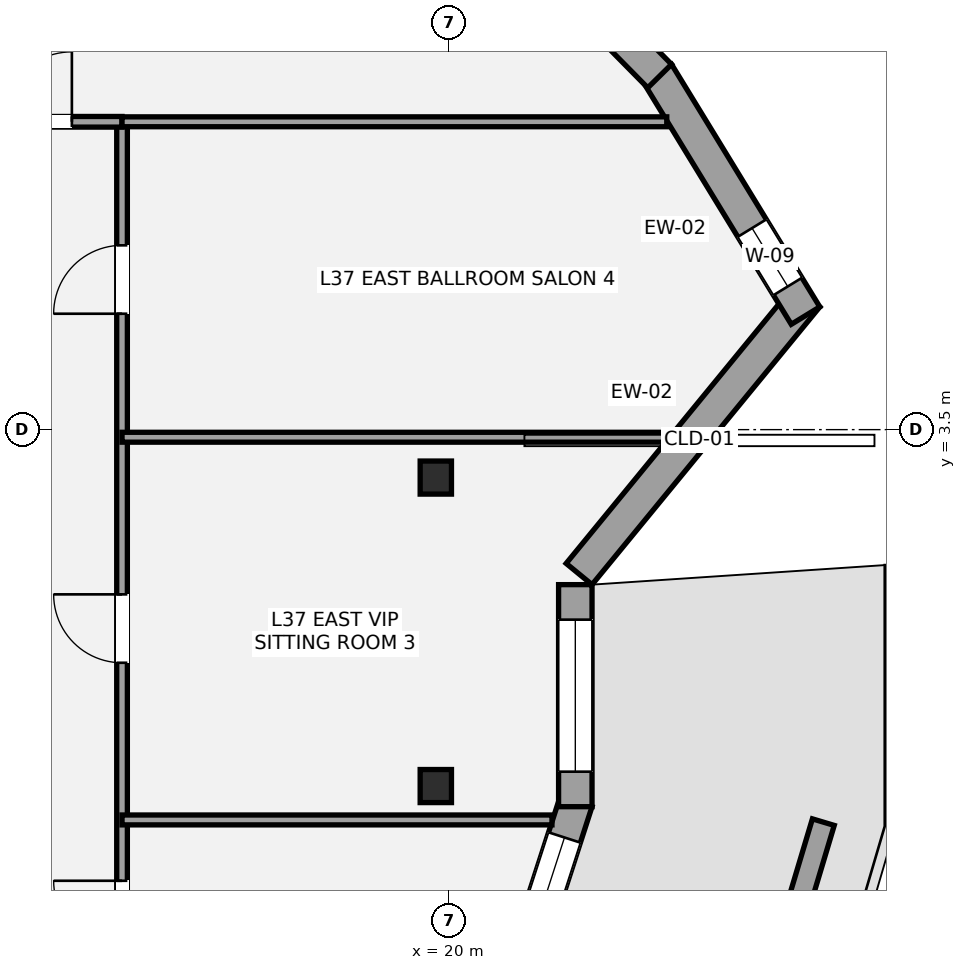
"""IFC4 building model, lengths in metres.
Left out: names, types, materials, properties, quantities, classifications, styles, units other than length and angle.
Written with IfcOpenShell. Run it as: python <this file> out.ifc"""

import sys

from ifc_helpers import new_model, si_unit, direction, frame, frame_2d, origin, origin_2d, place, context, subcontext, project, spatial, rectangle, i_section, extrude, element, fill, save


model = new_model("IFC4")
c1 = context("Model", 3, precision=1e-05, world=origin(), true_north=direction((0.0, 1.0)))
c2 = subcontext(c1, "Body", "Model", "MODEL_VIEW")
j1 = project(units=[si_unit("LENGTHUNIT", "METRE"), si_unit("PLANEANGLEUNIT", "RADIAN")], contexts=[c1])
p1 = place(None, origin())
s1 = spatial("IfcSite", under=j1, at=p1, CompositionType="ELEMENT")
p2 = place(p1, origin())
s2 = spatial("IfcBuilding", under=s1, at=p2, CompositionType="ELEMENT")
p3 = place(p2, frame((0.0, 0.0, 139.6)))
s3 = spatial("IfcBuildingStorey", under=s2, at=p3, CompositionType="ELEMENT", Elevation=139.6)
for number, where, z_axis, x_axis in (
    (1, (19.828, 2.869, 0.0), (0.0, 0.0, 1.0), (1.0, 0.0, 0.0)),
    (2, (19.828, -1.189, 0.0), (0.0, 0.0, 1.0), (1.0, 0.0, 0.0)),
):
    element("IfcColumn", number, at=place(p3, frame(where, z_axis=z_axis, x_axis=x_axis)), inside=s3, PredefinedType="COLUMN", context=c2, shape_type="SweptSolid", body=[
        extrude(i_section(OverallWidth=0.412, OverallDepth=0.435, WebThickness=0.036, FlangeThickness=0.057, at=origin_2d()), origin(), (0.0, 0.0, 1.0), 4.2),
    ])
p4 = place(p3, frame((24.71, 5.254, 0.0), z_axis=(0.0, 0.0, 1.0), x_axis=(-0.634087001858, -0.773261711244, 0.0)))
e3 = element("IfcWall", 3, at=p4, inside=s3, PredefinedType="STANDARD", context=c2, shape_type="SweptSolid", body=[
    extrude(rectangle(XDim=4.726, YDim=0.44, at=frame_2d((2.363, 0.0))), origin(), (0.0, 0.0, 1.0), 3.238),
])
p5 = place(p3, frame((22.742, 8.191, 0.0), z_axis=(0.0, 0.0, 1.0), x_axis=(0.521476412293, -0.853265698022, 0.0)))
e4 = element("IfcWall", 4, at=p5, inside=s3, PredefinedType="STANDARD", context=c2, shape_type="SweptSolid", body=[
    extrude(rectangle(XDim=3.74, YDim=0.44, at=frame_2d((1.87, 0.0))), origin(), (0.0, 0.0, 1.0), 3.238),
])
p6 = place(p5, frame((2.391, 0.0, 0.42)))
e5 = element("IfcOpeningElement", 5, at=p6, cuts=e4, PredefinedType="OPENING", context=c2, shape_type="SweptSolid", body=[
    extrude(rectangle(XDim=0.9, YDim=1.35, at=frame_2d((0.45, 0.675))), frame((0.0, 0.23, 0.0), z_axis=(0.0, -1.0, 0.0), x_axis=(1.0, 0.0, 0.0)), (0.0, 0.0, 1.0), 0.46),
])
p7 = place(p3, frame((19.942, 11.023, 0.0), z_axis=(0.0, 0.0, 1.0), x_axis=(0.702094935552, -0.712083352897, 0.0)))
e6 = element("IfcWall", 6, at=p7, inside=s3, PredefinedType="STANDARD", context=c2, shape_type="SweptSolid", body=[
    extrude(rectangle(XDim=4.033, YDim=0.44, at=frame_2d((2.017, 0.0))), origin(), (0.0, 0.0, 1.0), 3.238),
])
p8 = place(p7, frame((0.498, 0.0, 0.58)))
e7 = element("IfcOpeningElement", 7, at=p8, cuts=e6, PredefinedType="OPENING", context=c2, shape_type="SweptSolid", body=[
    extrude(rectangle(XDim=0.9, YDim=1.35, at=frame_2d((0.45, 0.675))), frame((0.0, 0.23, 0.0), z_axis=(0.0, -1.0, 0.0), x_axis=(1.0, 0.0, 0.0)), (0.0, 0.0, 1.0), 0.46),
])
p9 = place(p3, frame((21.674, -1.393, 0.0), z_axis=(0.0, 0.0, 1.0), x_axis=(-0.307750808514, -0.951466993573, 0.0)))
e8 = element("IfcWall", 8, at=p9, inside=s3, PredefinedType="STANDARD", context=c2, shape_type="SweptSolid", body=[
    extrude(rectangle(XDim=2.994, YDim=0.44, at=frame_2d((1.497, 0.0))), origin(), (0.0, 0.0, 1.0), 3.242),
])
p10 = place(p9, frame((0.497, 0.0, 0.6)))
e9 = element("IfcOpeningElement", 9, at=p10, cuts=e8, PredefinedType="OPENING", context=c2, shape_type="SweptSolid", body=[
    extrude(rectangle(XDim=2.0, YDim=2.1, at=frame_2d((1.0, 1.05))), frame((0.0, 0.23, 0.0), z_axis=(0.0, -1.0, 0.0), x_axis=(1.0, 0.0, 0.0)), (0.0, 0.0, 1.0), 0.46),
])
p11 = place(p3, frame((21.664, 1.461, 0.0), z_axis=(0.0, 0.0, 1.0), x_axis=(0.0, -1.0, 0.0)))
e10 = element("IfcWall", 10, at=p11, inside=s3, PredefinedType="STANDARD", context=c2, shape_type="SweptSolid", body=[
    extrude(rectangle(XDim=2.921, YDim=0.44, at=frame_2d((1.461, 0.0))), origin(), (0.0, 0.0, 1.0), 3.242),
])
p12 = place(p11, frame((0.461, 0.0, 0.6)))
e11 = element("IfcOpeningElement", 11, at=p12, cuts=e10, PredefinedType="OPENING", context=c2, shape_type="SweptSolid", body=[
    extrude(rectangle(XDim=2.0, YDim=2.1, at=frame_2d((1.0, 1.05))), frame((0.0, 0.23, 0.0), z_axis=(0.0, -1.0, 0.0), x_axis=(1.0, 0.0, 0.0)), (0.0, 0.0, 1.0), 0.46),
])
p13 = place(p3, frame((23.95, -4.924, 0.0), z_axis=(0.0, 0.0, 1.0), x_axis=(0.287110931175, 0.957897339593, 0.0)))
e12 = element("IfcWall", 12, at=p13, inside=s3, PredefinedType="PARAPET", context=c2, shape_type="SweptSolid", body=[
    extrude(rectangle(XDim=3.403, YDim=0.3, at=frame_2d((1.702, 0.0))), origin(), (0.0, 0.0, 1.0), 0.45),
])
p14 = place(p3, frame((15.7, -13.488, 0.0), z_axis=(0.0, 0.0, 1.0), x_axis=(0.0, 1.0, 0.0)))
e13 = element("IfcWall", 13, at=p14, inside=s3, PredefinedType="PARTITIONING", context=c2, shape_type="SweptSolid", body=[
    extrude(rectangle(XDim=21.038, YDim=0.14, at=frame_2d((10.519, 0.0))), origin(), (0.0, 0.0, 1.0), 3.473),
])
p15 = place(p14, frame((7.821, 0.0, 0.0)))
e14 = element("IfcOpeningElement", 14, at=p15, cuts=e13, PredefinedType="OPENING", context=c2, shape_type="SweptSolid", body=[
    extrude(rectangle(XDim=0.9, YDim=2.1, at=frame_2d((0.45, 1.05))), frame((0.0, 0.08, 0.0), z_axis=(0.0, -1.0, 0.0), x_axis=(1.0, 0.0, 0.0)), (0.0, 0.0, 1.0), 0.16),
])
p16 = place(p14, frame((10.153, 0.0, 0.0)))
e15 = element("IfcOpeningElement", 15, at=p16, cuts=e13, PredefinedType="OPENING", context=c2, shape_type="SweptSolid", body=[
    extrude(rectangle(XDim=0.9, YDim=2.1, at=frame_2d((0.45, 1.05))), frame((0.0, 0.08, 0.0), z_axis=(0.0, -1.0, 0.0), x_axis=(1.0, 0.0, 0.0)), (0.0, 0.0, 1.0), 0.16),
])
p17 = place(p14, frame((13.921, 0.0, 0.0)))
e16 = element("IfcOpeningElement", 16, at=p17, cuts=e13, PredefinedType="OPENING", context=c2, shape_type="SweptSolid", body=[
    extrude(rectangle(XDim=0.9, YDim=2.1, at=frame_2d((0.45, 1.05))), frame((0.0, 0.08, 0.0), z_axis=(0.0, -1.0, 0.0), x_axis=(1.0, 0.0, 0.0)), (0.0, 0.0, 1.0), 0.16),
])
p18 = place(p14, frame((18.513, 0.0, 0.0)))
e17 = element("IfcOpeningElement", 17, at=p18, cuts=e13, PredefinedType="OPENING", context=c2, shape_type="SweptSolid", body=[
    extrude(rectangle(XDim=0.9, YDim=2.1, at=frame_2d((0.45, 1.05))), frame((0.0, 0.08, 0.0), z_axis=(0.0, -1.0, 0.0), x_axis=(1.0, 0.0, 0.0)), (0.0, 0.0, 1.0), 0.16),
])
p19 = place(p3, frame((13.8, 7.55, 0.0), z_axis=(0.0, 0.0, 1.0), x_axis=(1.0, 0.0, 0.0)))
e18 = element("IfcWall", 18, at=p19, inside=s3, PredefinedType="PARTITIONING", context=c2, shape_type="SweptSolid", body=[
    extrude(rectangle(XDim=1.9, YDim=0.14, at=frame_2d((0.95, 0.0))), origin(), (0.0, 0.0, 1.0), 3.473),
])
p20 = place(p19, frame((0.32, 0.0, 0.0)))
e19 = element("IfcOpeningElement", 19, at=p20, cuts=e18, PredefinedType="OPENING", context=c2, shape_type="SweptSolid", body=[
    extrude(rectangle(XDim=0.92, YDim=2.15, at=frame_2d((0.46, 1.075))), frame((0.0, 0.08, 0.0), z_axis=(0.0, -1.0, 0.0), x_axis=(1.0, 0.0, 0.0)), (0.0, 0.0, 1.0), 0.16),
])
p21 = place(p3, frame((15.7, 7.55, 0.0), z_axis=(0.0, 0.0, 1.0), x_axis=(1.0, 0.0, 0.0)))
e20 = element("IfcWall", 20, at=p21, inside=s3, PredefinedType="PARTITIONING", context=c2, shape_type="SweptSolid", body=[
    extrude(rectangle(XDim=7.167, YDim=0.13, at=frame_2d((3.583, 0.0))), origin(), (0.0, 0.0, 1.0), 3.473),
])
p22 = place(p3, frame((15.7, -1.635, 0.0), z_axis=(0.0, 0.0, 1.0), x_axis=(1.0, 0.0, 0.0)))
e21 = element("IfcWall", 21, at=p22, inside=s3, PredefinedType="PARTITIONING", context=c2, shape_type="SweptSolid", body=[
    extrude(rectangle(XDim=5.656, YDim=0.13, at=frame_2d((2.828, 0.0))), origin(), (0.0, 0.0, 1.0), 3.398),
])
p23 = place(p3, frame((15.7, 3.4, 0.0), z_axis=(0.0, 0.0, 1.0), x_axis=(1.0, 0.0, 0.0)))
e22 = element("IfcWall", 22, at=p23, inside=s3, PredefinedType="PARTITIONING", context=c2, shape_type="SweptSolid", body=[
    extrude(rectangle(XDim=7.195, YDim=0.13, at=frame_2d((3.597, 0.0))), origin(), (0.0, 0.0, 1.0), 3.473),
])
p24 = place(p6, origin())
e23 = element("IfcWindow", 23, at=p24, inside=s3, PartitioningType="SINGLE_PANEL", PredefinedType="WINDOW", context=c2, shape_type="SweptSolid", body=[
    extrude(rectangle(XDim=0.9, YDim=1.35, at=frame_2d((0.45, 0.675))), frame((0.0, -0.01, 0.0), z_axis=(0.0, -1.0, 0.0), x_axis=(1.0, 0.0, 0.0)), (0.0, 0.0, 1.0), 0.06),
])
fill(e5, e23)
p25 = place(p10, origin())
e24 = element("IfcWindow", 24, at=p25, inside=s3, PartitioningType="SINGLE_PANEL", PredefinedType="WINDOW", context=c2, shape_type="SweptSolid", body=[
    extrude(rectangle(XDim=2.0, YDim=2.1, at=frame_2d((1.0, 1.05))), frame((0.0, -0.01, 0.0), z_axis=(0.0, -1.0, 0.0), x_axis=(1.0, 0.0, 0.0)), (0.0, 0.0, 1.0), 0.06),
])
fill(e9, e24)
p26 = place(p12, origin())
e25 = element("IfcWindow", 25, at=p26, inside=s3, PartitioningType="SINGLE_PANEL", PredefinedType="WINDOW", context=c2, shape_type="SweptSolid", body=[
    extrude(rectangle(XDim=2.0, YDim=2.1, at=frame_2d((1.0, 1.05))), frame((0.0, -0.01, 0.0), z_axis=(0.0, -1.0, 0.0), x_axis=(1.0, 0.0, 0.0)), (0.0, 0.0, 1.0), 0.06),
])
fill(e11, e25)
p27 = place(p20, origin())
e26 = element("IfcDoor", 26, at=p27, inside=s3, OperationType="SINGLE_SWING_RIGHT", PredefinedType="DOOR", context=c2, shape_type="SweptSolid", body=[
    extrude(rectangle(XDim=0.92, YDim=2.15, at=frame_2d((0.46, 1.075))), frame((0.0, 0.025, 0.0), z_axis=(0.0, -1.0, 0.0), x_axis=(1.0, 0.0, 0.0)), (0.0, 0.0, 1.0), 0.05),
])
fill(e19, e26)
p28 = place(p16, origin())
e27 = element("IfcDoor", 27, at=p28, inside=s3, OperationType="SINGLE_SWING_RIGHT", PredefinedType="DOOR", context=c2, shape_type="SweptSolid", body=[
    extrude(rectangle(XDim=0.9, YDim=2.1, at=frame_2d((0.45, 1.05))), frame((0.0, 0.025, 0.0), z_axis=(0.0, -1.0, 0.0), x_axis=(1.0, 0.0, 0.0)), (0.0, 0.0, 1.0), 0.05),
])
fill(e15, e27)
p29 = place(p17, origin())
e28 = element("IfcDoor", 28, at=p29, inside=s3, OperationType="SINGLE_SWING_RIGHT", PredefinedType="DOOR", context=c2, shape_type="SweptSolid", body=[
    extrude(rectangle(XDim=0.9, YDim=2.1, at=frame_2d((0.45, 1.05))), frame((0.0, 0.025, 0.0), z_axis=(0.0, -1.0, 0.0), x_axis=(1.0, 0.0, 0.0)), (0.0, 0.0, 1.0), 0.05),
])
fill(e16, e28)
p30 = place(p18, origin())
e29 = element("IfcDoor", 29, at=p30, inside=s3, OperationType="SINGLE_SWING_LEFT", PredefinedType="DOOR", context=c2, shape_type="SweptSolid", body=[
    extrude(rectangle(XDim=0.9, YDim=2.1, at=frame_2d((0.45, 1.05))), frame((0.0, 0.025, 0.0), z_axis=(0.0, -1.0, 0.0), x_axis=(1.0, 0.0, 0.0)), (0.0, 0.0, 1.0), 0.05),
])
fill(e17, e29)
save(model, sys.argv[1])
